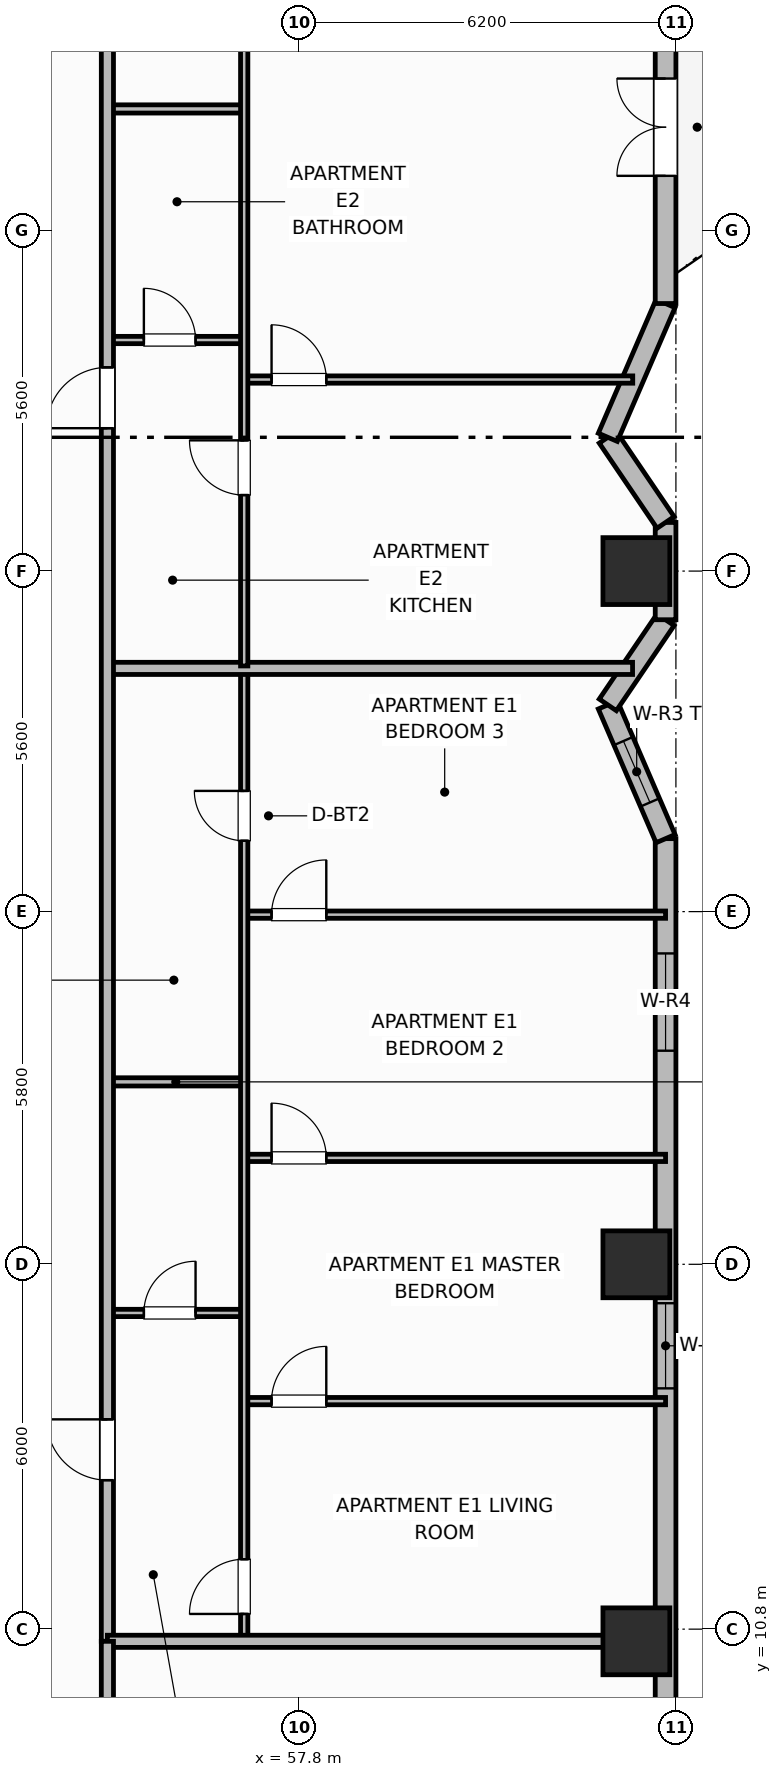
"""IFC4 building model, lengths in metres.
Left out: names, types, materials, properties, quantities, classifications, styles, units other than length and angle.
Written with IfcOpenShell. Run it as: python <this file> out.ifc"""

import sys

from ifc_helpers import new_model, si_unit, direction, frame, frame_2d, origin, origin_2d, place, context, subcontext, project, spatial, rectangle, extrude, element, fill, save


model = new_model("IFC4")
c1 = context("Model", 3, precision=1e-05, world=origin(), true_north=direction((0.0, 1.0)))
c2 = subcontext(c1, "Body", "Model", "MODEL_VIEW")
j1 = project(units=[si_unit("LENGTHUNIT", "METRE"), si_unit("PLANEANGLEUNIT", "RADIAN")], contexts=[c1])
p1 = place(None, origin())
s1 = spatial("IfcSite", under=j1, at=p1, CompositionType="ELEMENT")
p2 = place(p1, origin())
s2 = spatial("IfcBuilding", under=s1, at=p2, CompositionType="ELEMENT")
p3 = place(p2, frame((0.0, 0.0, 103.1)))
s3 = spatial("IfcBuildingStorey", under=s2, at=p3, CompositionType="ELEMENT", Elevation=103.1)
for number, where, z_axis, x_axis in (
    (1, (63.35, 10.6, 0.0), (0.0, 0.0, 1.0), (1.0, 0.0, 0.0)),
    (2, (63.35, 16.8, 0.0), (0.0, 0.0, 1.0), (1.0, 0.0, 0.0)),
    (3, (63.35, 28.2, 0.0), (0.0, 0.0, 1.0), (1.0, 0.0, 0.0)),
):
    element("IfcColumn", number, at=place(p3, frame(where, z_axis=z_axis, x_axis=x_axis)), inside=s3, PredefinedType="COLUMN", context=c2, shape_type="SweptSolid", body=[
        extrude(rectangle(XDim=1.1, YDim=1.1, at=origin_2d()), origin(), (0.0, 0.0, 1.0), 3.7),
    ])
p4 = place(p3, frame((63.83, 9.0, 0.0), z_axis=(0.0, 0.0, 1.0), x_axis=(0.0, 1.0, 0.0)))
e4 = element("IfcWall", 4, at=p4, inside=s3, PredefinedType="SOLIDWALL", context=c2, shape_type="SweptSolid", body=[
    extrude(rectangle(XDim=14.8, YDim=0.34, at=frame_2d((7.4, 0.0))), origin(), (0.0, 0.0, 1.0), 2.7),
])
p5 = place(p4, frame((5.76, 0.0, 0.69)))
e5 = element("IfcOpeningElement", 5, at=p5, cuts=e4, PredefinedType="OPENING", context=c2, shape_type="SweptSolid", body=[
    extrude(rectangle(XDim=1.4, YDim=1.85, at=frame_2d((0.7, 0.925))), frame((0.0, 0.18, 0.0), z_axis=(0.0, -1.0, 0.0), x_axis=(1.0, 0.0, 0.0)), (0.0, 0.0, 1.0), 0.36),
])
p6 = place(p4, frame((11.312, 0.0, 0.68)))
e6 = element("IfcOpeningElement", 6, at=p6, cuts=e4, PredefinedType="OPENING", context=c2, shape_type="SweptSolid", body=[
    extrude(rectangle(XDim=1.6, YDim=1.9, at=frame_2d((0.8, 0.95))), frame((0.0, 0.18, 0.0), z_axis=(0.0, -1.0, 0.0), x_axis=(1.0, 0.0, 0.0)), (0.0, 0.0, 1.0), 0.36),
])
p7 = place(p3, frame((63.83, 23.8, 0.0), z_axis=(0.0, 0.0, 1.0), x_axis=(-0.396512124623, 0.918029484835, 0.0)))
e7 = element("IfcWall", 7, at=p7, inside=s3, PredefinedType="SOLIDWALL", context=c2, shape_type="SweptSolid", body=[
    extrude(rectangle(XDim=2.396, YDim=0.34, at=frame_2d((1.198, 0.0))), origin(), (0.0, 0.0, 1.0), 2.7),
])
p8 = place(p7, frame((0.648, 0.0, 0.89)))
e8 = element("IfcOpeningElement", 8, at=p8, cuts=e7, PredefinedType="OPENING", context=c2, shape_type="SweptSolid", body=[
    extrude(rectangle(XDim=1.1, YDim=1.65, at=frame_2d((0.55, 0.825))), frame((0.0, 0.18, 0.0), z_axis=(0.0, -1.0, 0.0), x_axis=(1.0, 0.0, 0.0)), (0.0, 0.0, 1.0), 0.36),
])
p9 = place(p3, frame((62.88, 26.0, 0.0), z_axis=(0.0, 0.0, 1.0), x_axis=(0.561607274182, 0.827403933751, 0.0)))
e9 = element("IfcWall", 9, at=p9, inside=s3, PredefinedType="SOLIDWALL", context=c2, shape_type="SweptSolid", body=[
    extrude(rectangle(XDim=1.692, YDim=0.34, at=frame_2d((0.846, 0.0))), origin(), (0.0, 0.0, 1.0), 2.7),
])
p10 = place(p3, frame((63.83, 27.4, 0.0), z_axis=(0.0, 0.0, 1.0), x_axis=(0.0, 1.0, 0.0)))
e10 = element("IfcWall", 10, at=p10, inside=s3, PredefinedType="SOLIDWALL", context=c2, shape_type="SweptSolid", body=[
    extrude(rectangle(XDim=1.6, YDim=0.34, at=frame_2d((0.8, 0.0))), origin(), (0.0, 0.0, 1.0), 2.7),
])
p11 = place(p3, frame((63.83, 29.0, 0.0), z_axis=(0.0, 0.0, 1.0), x_axis=(-0.561607274182, 0.827403933751, 0.0)))
e11 = element("IfcWall", 11, at=p11, inside=s3, PredefinedType="SOLIDWALL", context=c2, shape_type="SweptSolid", body=[
    extrude(rectangle(XDim=1.692, YDim=0.34, at=frame_2d((0.846, 0.0))), origin(), (0.0, 0.0, 1.0), 2.7),
])
p12 = place(p3, frame((62.88, 30.4, 0.0), z_axis=(0.0, 0.0, 1.0), x_axis=(0.396475042899, 0.918045500157, 0.0)))
e12 = element("IfcWall", 12, at=p12, inside=s3, PredefinedType="SOLIDWALL", context=c2, shape_type="SweptSolid", body=[
    extrude(rectangle(XDim=2.397, YDim=0.34, at=frame_2d((1.198, 0.0))), origin(), (0.0, 0.0, 1.0), 2.7),
])
p13 = place(p3, frame((63.83, 32.6, 0.0), z_axis=(0.0, 0.0, 1.0), x_axis=(0.0, 1.0, 0.0)))
e13 = element("IfcWall", 13, at=p13, inside=s3, PredefinedType="SOLIDWALL", context=c2, shape_type="SweptSolid", body=[
    extrude(rectangle(XDim=14.8, YDim=0.34, at=frame_2d((7.4, 0.0))), origin(), (0.0, 0.0, 1.0), 2.7),
])
p14 = place(p13, frame((2.1, 0.0, 0.0)))
e14 = element("IfcOpeningElement", 14, at=p14, cuts=e13, PredefinedType="OPENING", context=c2, shape_type="SweptSolid", body=[
    extrude(rectangle(XDim=1.6, YDim=2.1, at=frame_2d((0.8, 1.05))), frame((0.0, 0.18, 0.0), z_axis=(0.0, -1.0, 0.0), x_axis=(1.0, 0.0, 0.0)), (0.0, 0.0, 1.0), 0.36),
])
p15 = place(p13, frame((5.0, 0.0, 0.69)))
e15 = element("IfcOpeningElement", 15, at=p15, cuts=e13, PredefinedType="OPENING", context=c2, shape_type="SweptSolid", body=[
    extrude(rectangle(XDim=1.4, YDim=1.85, at=frame_2d((0.7, 0.925))), frame((0.0, 0.18, 0.0), z_axis=(0.0, -1.0, 0.0), x_axis=(1.0, 0.0, 0.0)), (0.0, 0.0, 1.0), 0.36),
])
p16 = place(p13, frame((9.087, 0.0, 0.73)))
e16 = element("IfcOpeningElement", 16, at=p16, cuts=e13, PredefinedType="OPENING", context=c2, shape_type="SweptSolid", body=[
    extrude(rectangle(XDim=1.4, YDim=1.85, at=frame_2d((0.7, 0.925))), frame((0.0, 0.18, 0.0), z_axis=(0.0, -1.0, 0.0), x_axis=(1.0, 0.0, 0.0)), (0.0, 0.0, 1.0), 0.36),
])
p17 = place(p3, frame((54.65, 16.0, 0.0), z_axis=(0.0, 0.0, 1.0), x_axis=(1.0, 0.0, 0.0)))
e17 = element("IfcWall", 17, at=p17, inside=s3, PredefinedType="PARTITIONING", context=c2, shape_type="SweptSolid", body=[
    extrude(rectangle(XDim=2.25, YDim=0.12, at=frame_2d((1.125, 0.0))), origin(), (0.0, 0.0, 1.0), 2.53),
])
p18 = place(p17, frame((0.6, 0.0, 0.0)))
e18 = element("IfcOpeningElement", 18, at=p18, cuts=e17, PredefinedType="OPENING", context=c2, shape_type="SweptSolid", body=[
    extrude(rectangle(XDim=0.85, YDim=2.1, at=frame_2d((0.425, 1.05))), frame((0.0, 0.07, 0.0), z_axis=(0.0, -1.0, 0.0), x_axis=(1.0, 0.0, 0.0)), (0.0, 0.0, 1.0), 0.14),
])
p19 = place(p3, frame((54.65, 19.8, 0.0), z_axis=(0.0, 0.0, 1.0), x_axis=(1.0, 0.0, 0.0)))
e19 = element("IfcWall", 19, at=p19, inside=s3, PredefinedType="PARTITIONING", context=c2, shape_type="SweptSolid", body=[
    extrude(rectangle(XDim=2.25, YDim=0.135, at=frame_2d((1.125, 0.0))), origin(), (0.0, 0.0, 1.0), 2.53),
])
p20 = place(p3, frame((56.9, 14.55, 0.0), z_axis=(0.0, 0.0, 1.0), x_axis=(1.0, 0.0, 0.0)))
e20 = element("IfcWall", 20, at=p20, inside=s3, PredefinedType="PARTITIONING", context=c2, shape_type="SweptSolid", body=[
    extrude(rectangle(XDim=6.93, YDim=0.12, at=frame_2d((3.465, 0.0))), origin(), (0.0, 0.0, 1.0), 2.53),
])
p21 = place(p20, frame((0.45, 0.0, 0.0)))
e21 = element("IfcOpeningElement", 21, at=p21, cuts=e20, PredefinedType="OPENING", context=c2, shape_type="SweptSolid", body=[
    extrude(rectangle(XDim=0.9, YDim=2.1, at=frame_2d((0.45, 1.05))), frame((0.0, 0.07, 0.0), z_axis=(0.0, -1.0, 0.0), x_axis=(1.0, 0.0, 0.0)), (0.0, 0.0, 1.0), 0.14),
])
p22 = place(p3, frame((56.9, 18.55, 0.0), z_axis=(0.0, 0.0, 1.0), x_axis=(1.0, 0.0, 0.0)))
e22 = element("IfcWall", 22, at=p22, inside=s3, PredefinedType="PARTITIONING", context=c2, shape_type="SweptSolid", body=[
    extrude(rectangle(XDim=6.93, YDim=0.12, at=frame_2d((3.465, 0.0))), origin(), (0.0, 0.0, 1.0), 2.53),
])
p23 = place(p22, frame((0.45, 0.0, 0.0)))
e23 = element("IfcOpeningElement", 23, at=p23, cuts=e22, PredefinedType="OPENING", context=c2, shape_type="SweptSolid", body=[
    extrude(rectangle(XDim=0.9, YDim=2.1, at=frame_2d((0.45, 1.05))), frame((0.0, 0.07, 0.0), z_axis=(0.0, -1.0, 0.0), x_axis=(1.0, 0.0, 0.0)), (0.0, 0.0, 1.0), 0.14),
])
p24 = place(p3, frame((56.9, 22.55, 0.0), z_axis=(0.0, 0.0, 1.0), x_axis=(1.0, 0.0, 0.0)))
e24 = element("IfcWall", 24, at=p24, inside=s3, PredefinedType="PARTITIONING", context=c2, shape_type="SweptSolid", body=[
    extrude(rectangle(XDim=6.93, YDim=0.12, at=frame_2d((3.465, 0.0))), origin(), (0.0, 0.0, 1.0), 2.53),
])
p25 = place(p24, frame((0.45, 0.0, 0.0)))
e25 = element("IfcOpeningElement", 25, at=p25, cuts=e24, PredefinedType="OPENING", context=c2, shape_type="SweptSolid", body=[
    extrude(rectangle(XDim=0.9, YDim=2.1, at=frame_2d((0.45, 1.05))), frame((0.0, 0.07, 0.0), z_axis=(0.0, -1.0, 0.0), x_axis=(1.0, 0.0, 0.0)), (0.0, 0.0, 1.0), 0.14),
])
p26 = place(p3, frame((56.9, 10.64, 0.0), z_axis=(0.0, 0.0, 1.0), x_axis=(0.0, 1.0, 0.0)))
e26 = element("IfcWall", 26, at=p26, inside=s3, PredefinedType="PARTITIONING", context=c2, shape_type="SweptSolid", body=[
    extrude(rectangle(XDim=15.92, YDim=0.12, at=frame_2d((7.96, 0.0))), origin(), (0.0, 0.0, 1.0), 2.53),
])
p27 = place(p26, frame((0.41, 0.0, 0.0)))
e27 = element("IfcOpeningElement", 27, at=p27, cuts=e26, PredefinedType="OPENING", context=c2, shape_type="SweptSolid", body=[
    extrude(rectangle(XDim=0.9, YDim=2.1, at=frame_2d((0.45, 1.05))), frame((0.0, 0.07, 0.0), z_axis=(0.0, -1.0, 0.0), x_axis=(1.0, 0.0, 0.0)), (0.0, 0.0, 1.0), 0.14),
])
p28 = place(p26, frame((13.125, 0.0, 0.0)))
e28 = element("IfcOpeningElement", 28, at=p28, cuts=e26, PredefinedType="OPENING", context=c2, shape_type="SweptSolid", body=[
    extrude(rectangle(XDim=0.82, YDim=2.08, at=frame_2d((0.41, 1.04))), frame((0.0, 0.07, 0.0), z_axis=(0.0, -1.0, 0.0), x_axis=(1.0, 0.0, 0.0)), (0.0, 0.0, 1.0), 0.14),
])
p29 = place(p3, frame((54.65, 26.6, 0.0), z_axis=(0.0, 0.0, 1.0), x_axis=(1.0, 0.0, 0.0)))
e29 = element("IfcWall", 29, at=p29, inside=s3, PredefinedType="PARTITIONING", context=c2, shape_type="SweptSolid", body=[
    extrude(rectangle(XDim=8.637, YDim=0.2, at=frame_2d((4.319, 0.0))), origin(), (0.0, 0.0, 1.0), 2.53),
])
p30 = place(p3, frame((54.65, 32.0, 0.0), z_axis=(0.0, 0.0, 1.0), x_axis=(1.0, 0.0, 0.0)))
e30 = element("IfcWall", 30, at=p30, inside=s3, PredefinedType="PARTITIONING", context=c2, shape_type="SweptSolid", body=[
    extrude(rectangle(XDim=2.25, YDim=0.12, at=frame_2d((1.125, 0.0))), origin(), (0.0, 0.0, 1.0), 2.53),
])
p31 = place(p30, frame((0.6, 0.0, 0.0)))
e31 = element("IfcOpeningElement", 31, at=p31, cuts=e30, PredefinedType="OPENING", context=c2, shape_type="SweptSolid", body=[
    extrude(rectangle(XDim=0.85, YDim=2.1, at=frame_2d((0.425, 1.05))), frame((0.0, 0.07, 0.0), z_axis=(0.0, -1.0, 0.0), x_axis=(1.0, 0.0, 0.0)), (0.0, 0.0, 1.0), 0.14),
])
p32 = place(p3, frame((54.65, 35.8, 0.0), z_axis=(0.0, 0.0, 1.0), x_axis=(1.0, 0.0, 0.0)))
e32 = element("IfcWall", 32, at=p32, inside=s3, PredefinedType="PARTITIONING", context=c2, shape_type="SweptSolid", body=[
    extrude(rectangle(XDim=2.25, YDim=0.135, at=frame_2d((1.125, 0.0))), origin(), (0.0, 0.0, 1.0), 2.53),
])
p33 = place(p3, frame((56.9, 31.35, 0.0), z_axis=(0.0, 0.0, 1.0), x_axis=(1.0, 0.0, 0.0)))
e33 = element("IfcWall", 33, at=p33, inside=s3, PredefinedType="PARTITIONING", context=c2, shape_type="SweptSolid", body=[
    extrude(rectangle(XDim=6.39, YDim=0.12, at=frame_2d((3.195, 0.0))), origin(), (0.0, 0.0, 1.0), 2.53),
])
p34 = place(p33, frame((0.45, 0.0, 0.0)))
e34 = element("IfcOpeningElement", 34, at=p34, cuts=e33, PredefinedType="OPENING", context=c2, shape_type="SweptSolid", body=[
    extrude(rectangle(XDim=0.9, YDim=2.1, at=frame_2d((0.45, 1.05))), frame((0.0, 0.07, 0.0), z_axis=(0.0, -1.0, 0.0), x_axis=(1.0, 0.0, 0.0)), (0.0, 0.0, 1.0), 0.14),
])
p35 = place(p3, frame((56.9, 26.64, 0.0), z_axis=(0.0, 0.0, 1.0), x_axis=(0.0, 1.0, 0.0)))
e35 = element("IfcWall", 35, at=p35, inside=s3, PredefinedType="PARTITIONING", context=c2, shape_type="SweptSolid", body=[
    extrude(rectangle(XDim=19.12, YDim=0.12, at=frame_2d((9.56, 0.0))), origin(), (0.0, 0.0, 1.0), 2.53),
])
p36 = place(p35, frame((2.81, 0.0, 0.0)))
e36 = element("IfcOpeningElement", 36, at=p36, cuts=e35, PredefinedType="OPENING", context=c2, shape_type="SweptSolid", body=[
    extrude(rectangle(XDim=0.9, YDim=2.1, at=frame_2d((0.45, 1.05))), frame((0.0, 0.07, 0.0), z_axis=(0.0, -1.0, 0.0), x_axis=(1.0, 0.0, 0.0)), (0.0, 0.0, 1.0), 0.14),
])
p37 = place(p35, frame((16.18, 0.0, 0.0)))
e37 = element("IfcOpeningElement", 37, at=p37, cuts=e35, PredefinedType="OPENING", context=c2, shape_type="SweptSolid", body=[
    extrude(rectangle(XDim=0.82, YDim=2.08, at=frame_2d((0.41, 1.04))), frame((0.0, 0.07, 0.0), z_axis=(0.0, -1.0, 0.0), x_axis=(1.0, 0.0, 0.0)), (0.0, 0.0, 1.0), 0.14),
])
p38 = place(p3, frame((54.65, 10.6, 0.0), z_axis=(0.0, 0.0, 1.0), x_axis=(0.0, 1.0, 0.0)))
e38 = element("IfcWall", 38, at=p38, inside=s3, PredefinedType="PARTITIONING", context=c2, shape_type="SweptSolid", body=[
    extrude(rectangle(XDim=35.2, YDim=0.2, at=frame_2d((17.6, 0.0))), origin(), (0.0, 0.0, 1.0), 2.53),
])
p39 = place(p38, frame((2.65, 0.0, 0.0)))
e39 = element("IfcOpeningElement", 39, at=p39, cuts=e38, PredefinedType="OPENING", context=c2, shape_type="SweptSolid", body=[
    extrude(rectangle(XDim=1.0, YDim=2.15, at=frame_2d((0.5, 1.075))), frame((0.0, 0.11, 0.0), z_axis=(0.0, -1.0, 0.0), x_axis=(1.0, 0.0, 0.0)), (0.0, 0.0, 1.0), 0.22),
])
p40 = place(p38, frame((19.95, 0.0, 0.0)))
e40 = element("IfcOpeningElement", 40, at=p40, cuts=e38, PredefinedType="OPENING", context=c2, shape_type="SweptSolid", body=[
    extrude(rectangle(XDim=1.0, YDim=2.15, at=frame_2d((0.5, 1.075))), frame((0.0, 0.11, 0.0), z_axis=(0.0, -1.0, 0.0), x_axis=(1.0, 0.0, 0.0)), (0.0, 0.0, 1.0), 0.22),
])
p41 = place(p3, frame((54.65, 10.6, 0.0), z_axis=(0.0, 0.0, 1.0), x_axis=(1.0, 0.0, 0.0)))
e41 = element("IfcWall", 41, at=p41, inside=s3, PredefinedType="PARTITIONING", context=c2, shape_type="SweptSolid", body=[
    extrude(rectangle(XDim=8.76, YDim=0.2, at=frame_2d((4.38, 0.0))), origin(), (0.0, 0.0, 1.0), 2.53),
])
p42 = place(p3, frame((54.65, 4.97, 0.0), z_axis=(0.0, 0.0, 1.0), x_axis=(0.0, 1.0, 0.0)))
e42 = element("IfcWall", 42, at=p42, inside=s3, PredefinedType="PARTITIONING", context=c2, shape_type="SweptSolid", body=[
    extrude(rectangle(XDim=5.63, YDim=0.2, at=frame_2d((2.815, 0.0))), origin(), (0.0, 0.0, 1.0), 2.53),
])
p43 = place(p5, origin())
e43 = element("IfcWindow", 43, at=p43, inside=s3, PartitioningType="SINGLE_PANEL", PredefinedType="WINDOW", context=c2, shape_type="SweptSolid", body=[
    extrude(rectangle(XDim=1.4, YDim=1.85, at=frame_2d((0.7, 0.925))), frame((0.0, 0.03, 0.0), z_axis=(0.0, -1.0, 0.0), x_axis=(1.0, 0.0, 0.0)), (0.0, 0.0, 1.0), 0.06),
])
fill(e5, e43)
p44 = place(p6, origin())
e44 = element("IfcWindow", 44, at=p44, inside=s3, PartitioningType="SINGLE_PANEL", PredefinedType="WINDOW", context=c2, shape_type="SweptSolid", body=[
    extrude(rectangle(XDim=1.6, YDim=1.9, at=frame_2d((0.8, 0.95))), frame((0.0, 0.03, 0.0), z_axis=(0.0, -1.0, 0.0), x_axis=(1.0, 0.0, 0.0)), (0.0, 0.0, 1.0), 0.06),
])
fill(e6, e44)
p45 = place(p8, origin())
e45 = element("IfcWindow", 45, at=p45, inside=s3, PartitioningType="SINGLE_PANEL", PredefinedType="WINDOW", context=c2, shape_type="SweptSolid", body=[
    extrude(rectangle(XDim=1.1, YDim=1.65, at=frame_2d((0.55, 0.825))), frame((0.0, 0.03, 0.0), z_axis=(0.0, -1.0, 0.0), x_axis=(1.0, 0.0, 0.0)), (0.0, 0.0, 1.0), 0.06),
])
fill(e8, e45)
p46 = place(p14, origin())
e46 = element("IfcDoor", 46, at=p46, inside=s3, OperationType="DOUBLE_DOOR_SINGLE_SWING", PredefinedType="DOOR", context=c2, shape_type="SweptSolid", body=[
    extrude(rectangle(XDim=1.6, YDim=2.1, at=frame_2d((0.8, 1.05))), frame((0.0, 0.025, 0.0), z_axis=(0.0, -1.0, 0.0), x_axis=(1.0, 0.0, 0.0)), (0.0, 0.0, 1.0), 0.05),
])
fill(e14, e46)
p47 = place(p18, origin())
e47 = element("IfcDoor", 47, at=p47, inside=s3, OperationType="SINGLE_SWING_RIGHT", PredefinedType="DOOR", context=c2, shape_type="SweptSolid", body=[
    extrude(rectangle(XDim=0.85, YDim=2.1, at=frame_2d((0.425, 1.05))), frame((0.0, 0.025, 0.0), z_axis=(0.0, -1.0, 0.0), x_axis=(1.0, 0.0, 0.0)), (0.0, 0.0, 1.0), 0.05),
])
fill(e18, e47)
p48 = place(p21, origin())
e48 = element("IfcDoor", 48, at=p48, inside=s3, OperationType="SINGLE_SWING_RIGHT", PredefinedType="DOOR", context=c2, shape_type="SweptSolid", body=[
    extrude(rectangle(XDim=0.9, YDim=2.1, at=frame_2d((0.45, 1.05))), frame((0.0, 0.025, 0.0), z_axis=(0.0, -1.0, 0.0), x_axis=(1.0, 0.0, 0.0)), (0.0, 0.0, 1.0), 0.05),
])
fill(e21, e48)
p49 = place(p23, origin())
e49 = element("IfcDoor", 49, at=p49, inside=s3, OperationType="SINGLE_SWING_LEFT", PredefinedType="DOOR", context=c2, shape_type="SweptSolid", body=[
    extrude(rectangle(XDim=0.9, YDim=2.1, at=frame_2d((0.45, 1.05))), frame((0.0, 0.025, 0.0), z_axis=(0.0, -1.0, 0.0), x_axis=(1.0, 0.0, 0.0)), (0.0, 0.0, 1.0), 0.05),
])
fill(e23, e49)
p50 = place(p25, origin())
e50 = element("IfcDoor", 50, at=p50, inside=s3, OperationType="SINGLE_SWING_RIGHT", PredefinedType="DOOR", context=c2, shape_type="SweptSolid", body=[
    extrude(rectangle(XDim=0.9, YDim=2.1, at=frame_2d((0.45, 1.05))), frame((0.0, 0.025, 0.0), z_axis=(0.0, -1.0, 0.0), x_axis=(1.0, 0.0, 0.0)), (0.0, 0.0, 1.0), 0.05),
])
fill(e25, e50)
p51 = place(p27, origin())
e51 = element("IfcDoor", 51, at=p51, inside=s3, OperationType="SINGLE_SWING_LEFT", PredefinedType="DOOR", context=c2, shape_type="SweptSolid", body=[
    extrude(rectangle(XDim=0.9, YDim=2.1, at=frame_2d((0.45, 1.05))), frame((0.0, 0.025, 0.0), z_axis=(0.0, -1.0, 0.0), x_axis=(1.0, 0.0, 0.0)), (0.0, 0.0, 1.0), 0.05),
])
fill(e27, e51)
p52 = place(p28, origin())
e52 = element("IfcDoor", 52, at=p52, inside=s3, OperationType="SINGLE_SWING_RIGHT", PredefinedType="DOOR", context=c2, shape_type="SweptSolid", body=[
    extrude(rectangle(XDim=0.82, YDim=2.08, at=frame_2d((0.41, 1.04))), frame((0.0, 0.025, 0.0), z_axis=(0.0, -1.0, 0.0), x_axis=(1.0, 0.0, 0.0)), (0.0, 0.0, 1.0), 0.05),
])
fill(e28, e52)
p53 = place(p31, origin())
e53 = element("IfcDoor", 53, at=p53, inside=s3, OperationType="SINGLE_SWING_LEFT", PredefinedType="DOOR", context=c2, shape_type="SweptSolid", body=[
    extrude(rectangle(XDim=0.85, YDim=2.1, at=frame_2d((0.425, 1.05))), frame((0.0, 0.025, 0.0), z_axis=(0.0, -1.0, 0.0), x_axis=(1.0, 0.0, 0.0)), (0.0, 0.0, 1.0), 0.05),
])
fill(e31, e53)
p54 = place(p34, origin())
e54 = element("IfcDoor", 54, at=p54, inside=s3, OperationType="SINGLE_SWING_LEFT", PredefinedType="DOOR", context=c2, shape_type="SweptSolid", body=[
    extrude(rectangle(XDim=0.9, YDim=2.1, at=frame_2d((0.45, 1.05))), frame((0.0, 0.025, 0.0), z_axis=(0.0, -1.0, 0.0), x_axis=(1.0, 0.0, 0.0)), (0.0, 0.0, 1.0), 0.05),
])
fill(e34, e54)
p55 = place(p36, origin())
e55 = element("IfcDoor", 55, at=p55, inside=s3, OperationType="SINGLE_SWING_RIGHT", PredefinedType="DOOR", context=c2, shape_type="SweptSolid", body=[
    extrude(rectangle(XDim=0.9, YDim=2.1, at=frame_2d((0.45, 1.05))), frame((0.0, 0.025, 0.0), z_axis=(0.0, -1.0, 0.0), x_axis=(1.0, 0.0, 0.0)), (0.0, 0.0, 1.0), 0.05),
])
fill(e36, e55)
p56 = place(p39, origin())
e56 = element("IfcDoor", 56, at=p56, inside=s3, OperationType="SINGLE_SWING_RIGHT", PredefinedType="DOOR", context=c2, shape_type="SweptSolid", body=[
    extrude(rectangle(XDim=1.0, YDim=2.15, at=frame_2d((0.5, 1.075))), frame((0.0, 0.025, 0.0), z_axis=(0.0, -1.0, 0.0), x_axis=(1.0, 0.0, 0.0)), (0.0, 0.0, 1.0), 0.05),
])
fill(e39, e56)
p57 = place(p40, origin())
e57 = element("IfcDoor", 57, at=p57, inside=s3, OperationType="SINGLE_SWING_LEFT", PredefinedType="DOOR", context=c2, shape_type="SweptSolid", body=[
    extrude(rectangle(XDim=1.0, YDim=2.15, at=frame_2d((0.5, 1.075))), frame((0.0, 0.025, 0.0), z_axis=(0.0, -1.0, 0.0), x_axis=(1.0, 0.0, 0.0)), (0.0, 0.0, 1.0), 0.05),
])
fill(e40, e57)
save(model, sys.argv[1])
